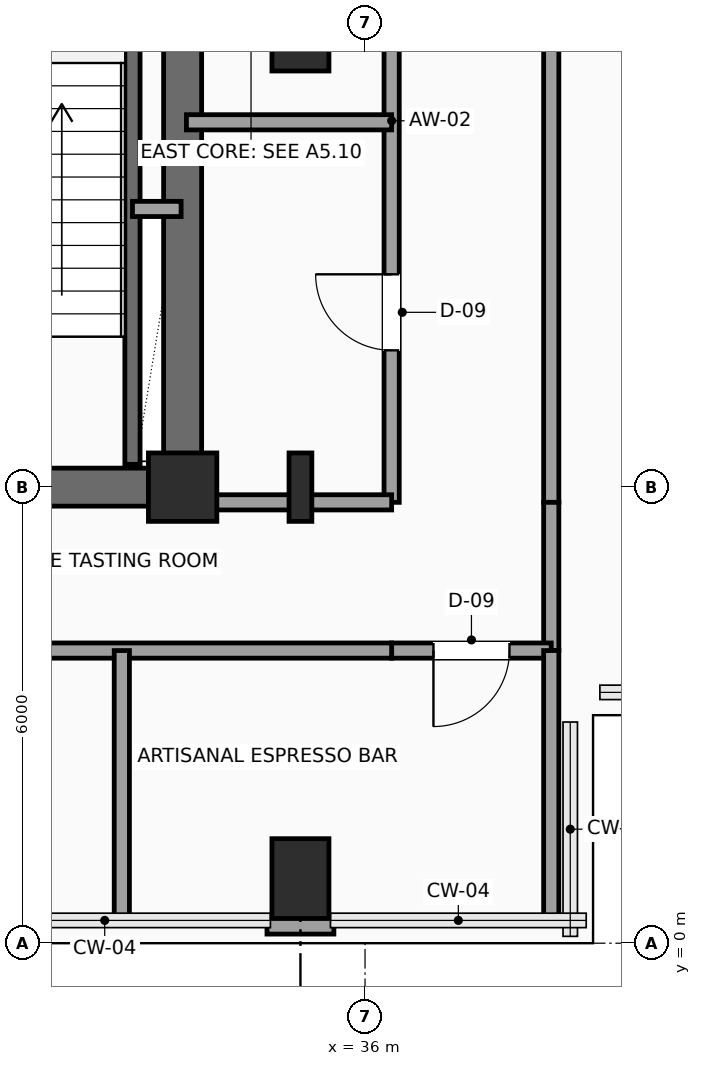
"""IFC4 building model, lengths in metres.
Left out: names, types, materials, properties, quantities, classifications, styles, units other than length and angle.
Written with IfcOpenShell. Run it as: python <this file> out.ifc"""

import sys

from ifc_helpers import new_model, si_unit, direction, frame, frame_2d, origin, origin_2d, place, context, subcontext, project, spatial, rectangle, i_section, extrude, element, fill, save


model = new_model("IFC4")
c1 = context("Model", 3, precision=1e-05, world=origin(), true_north=direction((0.0, 1.0)))
c2 = subcontext(c1, "Body", "Model", "MODEL_VIEW")
j1 = project(units=[si_unit("LENGTHUNIT", "METRE"), si_unit("PLANEANGLEUNIT", "RADIAN")], contexts=[c1])
p1 = place(None, origin())
s1 = spatial("IfcSite", under=j1, at=p1, CompositionType="ELEMENT")
p2 = place(p1, origin())
s2 = spatial("IfcBuilding", under=s1, at=p2, CompositionType="ELEMENT")
p3 = place(p2, frame((0.0, 0.0, 176.7)))
s3 = spatial("IfcBuildingStorey", under=s2, at=p3, CompositionType="ELEMENT", Elevation=176.7)
p4 = place(p3, frame((33.6, 6.0, 0.0), z_axis=(0.0, 0.0, 1.0), x_axis=(1.0, 0.0, 0.0)))
e1 = element("IfcColumn", 1, at=p4, inside=s3, PredefinedType="COLUMN", context=c2, shape_type="SweptSolid", body=[
    extrude(rectangle(XDim=0.9, YDim=0.9, at=origin_2d()), origin(), (0.0, 0.0, 1.0), 3.75),
])
p5 = place(p3, frame((35.15, 0.85, 0.0), z_axis=(0.0, 0.0, 1.0), x_axis=(1.0, 0.0, 0.0)))
e2 = element("IfcColumn", 2, at=p5, inside=s3, PredefinedType="COLUMN", context=c2, shape_type="SweptSolid", body=[
    extrude(rectangle(XDim=0.75, YDim=1.05, at=origin_2d()), origin(), (0.0, 0.0, 1.0), 3.75),
])
p6 = place(p3, frame((35.15, 6.0, 0.0), z_axis=(0.0, 0.0, 1.0), x_axis=(1.0, 0.0, 0.0)))
e3 = element("IfcColumn", 3, at=p6, inside=s3, PredefinedType="COLUMN", context=c2, shape_type="SweptSolid", body=[
    extrude(i_section(OverallWidth=0.3, OverallDepth=0.9, WebThickness=0.019, FlangeThickness=0.035, FilletRadius=0.03, at=origin_2d()), origin(), (0.0, 0.0, 1.0), 3.75),
])
p7 = place(p3, frame((35.15, 12.0, 0.0), z_axis=(0.0, 0.0, 1.0), x_axis=(1.0, 0.0, 0.0)))
e4 = element("IfcColumn", 4, at=p7, inside=s3, PredefinedType="COLUMN", context=c2, shape_type="SweptSolid", body=[
    extrude(rectangle(XDim=0.75, YDim=1.05, at=origin_2d()), origin(), (0.0, 0.0, 1.0), 3.75),
])
p8 = place(p3, frame((35.59, 0.24, 0.0), z_axis=(0.0, 0.0, 1.0), x_axis=(-1.0, 0.0, 0.0)))
e5 = element("IfcWall", 5, at=p8, inside=s3, PredefinedType="SOLIDWALL", context=c2, shape_type="SweptSolid", body=[
    extrude(rectangle(XDim=0.88, YDim=0.24, at=frame_2d((0.44, 0.0))), origin(), (0.0, 0.0, 1.0), 3.54),
])
p9 = place(p3, frame((24.0, 6.0, 0.0), z_axis=(0.0, 0.0, 1.0), x_axis=(1.0, 0.0, 0.0)))
e6 = element("IfcWall", 6, at=p9, inside=s3, PredefinedType="SHEAR", context=c2, shape_type="SweptSolid", body=[
    extrude(rectangle(XDim=9.6, YDim=0.5, at=frame_2d((4.8, 0.0))), origin(), (0.0, 0.0, 1.0), 3.54),
])
p10 = place(p3, frame((33.6, 6.0, 0.0), z_axis=(0.0, 0.0, 1.0), x_axis=(0.0, 1.0, 0.0)))
e7 = element("IfcWall", 7, at=p10, inside=s3, PredefinedType="SHEAR", context=c2, shape_type="SweptSolid", body=[
    extrude(rectangle(XDim=12.0, YDim=0.5, at=frame_2d((6.0, 0.0))), origin(), (0.0, 0.0, 1.0), 3.54),
])
p11 = place(p10, frame((10.15, 0.0, 0.0)))
e8 = element("IfcOpeningElement", 8, at=p11, cuts=e7, PredefinedType="OPENING", context=c2, shape_type="SweptSolid", body=[
    extrude(rectangle(XDim=0.9, YDim=2.15, at=frame_2d((0.45, 1.075))), frame((0.0, 0.26, 0.0), z_axis=(0.0, -1.0, 0.0), x_axis=(1.0, 0.0, 0.0)), (0.0, 0.0, 1.0), 0.52),
])
p12 = place(p3, frame((32.94, 6.3, 0.0), z_axis=(0.0, 0.0, 1.0), x_axis=(0.0, 1.0, 0.0)))
e9 = element("IfcWall", 9, at=p12, inside=s3, PredefinedType="SHEAR", context=c2, shape_type="SweptSolid", body=[
    extrude(rectangle(XDim=8.88, YDim=0.2, at=frame_2d((4.44, 0.0))), origin(), (0.0, 0.0, 1.0), 3.54),
])
p13 = place(p3, frame((32.94, 9.66, 0.0), z_axis=(0.0, 0.0, 1.0), x_axis=(1.0, 0.0, 0.0)))
e10 = element("IfcWall", 10, at=p13, inside=s3, PredefinedType="SOLIDWALL", context=c2, shape_type="SweptSolid", body=[
    extrude(rectangle(XDim=0.64, YDim=0.2, at=frame_2d((0.32, 0.0))), origin(), (0.0, 0.0, 1.0), 3.54),
])
p14 = place(p3, frame((36.35, 5.8, 0.0), z_axis=(0.0, 0.0, 1.0), x_axis=(0.0, 1.0, 0.0)))
e11 = element("IfcWall", 11, at=p14, inside=s3, PredefinedType="PARTITIONING", context=c2, shape_type="SweptSolid", body=[
    extrude(rectangle(XDim=10.08, YDim=0.2, at=frame_2d((5.04, 0.0))), origin(), (0.0, 0.0, 1.0), 3.54),
])
p15 = place(p14, frame((2.0, 0.0, 0.0)))
e12 = element("IfcOpeningElement", 12, at=p15, cuts=e11, PredefinedType="OPENING", context=c2, shape_type="SweptSolid", body=[
    extrude(rectangle(XDim=1.0, YDim=2.2, at=frame_2d((0.5, 1.1))), frame((0.0, 0.11, 0.0), z_axis=(0.0, -1.0, 0.0), x_axis=(1.0, 0.0, 0.0)), (0.0, 0.0, 1.0), 0.22),
])
p16 = place(p14, frame((7.04, 0.0, 0.0)))
e13 = element("IfcOpeningElement", 13, at=p16, cuts=e11, PredefinedType="OPENING", context=c2, shape_type="SweptSolid", body=[
    extrude(rectangle(XDim=1.0, YDim=2.2, at=frame_2d((0.5, 1.1))), frame((0.0, 0.11, 0.0), z_axis=(0.0, -1.0, 0.0), x_axis=(1.0, 0.0, 0.0)), (0.0, 0.0, 1.0), 0.22),
])
p17 = place(p3, frame((38.45, 14.2, 0.0), z_axis=(0.0, 0.0, 1.0), x_axis=(0.0, -1.0, 0.0)))
e14 = element("IfcWall", 14, at=p17, inside=s3, PredefinedType="PARTITIONING", context=c2, shape_type="SweptSolid", body=[
    extrude(rectangle(XDim=8.4, YDim=0.2, at=frame_2d((4.2, 0.0))), origin(), (0.0, 0.0, 1.0), 3.54),
])
p18 = place(p3, frame((38.45, 5.8, 0.0), z_axis=(0.0, 0.0, 1.0), x_axis=(0.0, -1.0, 0.0)))
e15 = element("IfcWall", 15, at=p18, inside=s3, PredefinedType="PARTITIONING", context=c2, shape_type="SweptSolid", body=[
    extrude(rectangle(XDim=1.95, YDim=0.2, at=frame_2d((0.975, 0.0))), origin(), (0.0, 0.0, 1.0), 3.54),
])
p19 = place(p3, frame((38.45, 3.85, 0.0), z_axis=(0.0, 0.0, 1.0), x_axis=(-1.0, 0.0, 0.0)))
e16 = element("IfcWall", 16, at=p19, inside=s3, PredefinedType="PARTITIONING", context=c2, shape_type="SweptSolid", body=[
    extrude(rectangle(XDim=2.1, YDim=0.2, at=frame_2d((1.05, 0.0))), origin(), (0.0, 0.0, 1.0), 3.54),
])
p20 = place(p19, frame((0.55, 0.0, 0.0)))
e17 = element("IfcOpeningElement", 17, at=p20, cuts=e16, PredefinedType="OPENING", context=c2, shape_type="SweptSolid", body=[
    extrude(rectangle(XDim=1.0, YDim=2.2, at=frame_2d((0.5, 1.1))), frame((0.0, 0.11, 0.0), z_axis=(0.0, -1.0, 0.0), x_axis=(1.0, 0.0, 0.0)), (0.0, 0.0, 1.0), 0.22),
])
p21 = place(p3, frame((36.35, 3.85, 0.0), z_axis=(0.0, 0.0, 1.0), x_axis=(-1.0, 0.0, 0.0)))
e18 = element("IfcWall", 18, at=p21, inside=s3, PredefinedType="PARTITIONING", context=c2, shape_type="SweptSolid", body=[
    extrude(rectangle(XDim=12.4, YDim=0.2, at=frame_2d((6.2, 0.0))), origin(), (0.0, 0.0, 1.0), 3.54),
])
p22 = place(p21, frame((10.325, 0.0, 0.0)))
e19 = element("IfcOpeningElement", 19, at=p22, cuts=e18, PredefinedType="OPENING", context=c2, shape_type="SweptSolid", body=[
    extrude(rectangle(XDim=1.0, YDim=2.2, at=frame_2d((0.5, 1.1))), frame((0.0, 0.11, 0.0), z_axis=(0.0, -1.0, 0.0), x_axis=(1.0, 0.0, 0.0)), (0.0, 0.0, 1.0), 0.22),
])
p23 = place(p21, frame((5.9, 0.0, 0.0)))
e20 = element("IfcOpeningElement", 20, at=p23, cuts=e18, PredefinedType="OPENING", context=c2, shape_type="SweptSolid", body=[
    extrude(rectangle(XDim=1.0, YDim=2.2, at=frame_2d((0.5, 1.1))), frame((0.0, 0.11, 0.0), z_axis=(0.0, -1.0, 0.0), x_axis=(1.0, 0.0, 0.0)), (0.0, 0.0, 1.0), 0.22),
])
for number, where, z_axis, x_axis in (
    (21, (32.8, 0.3, 0.0), (0.0, 0.0, 1.0), (0.0, 1.0, 0.0)),
    (22, (38.45, 0.3, 0.0), (0.0, 0.0, 1.0), (0.0, 1.0, 0.0)),
):
    element("IfcWall", number, at=place(p3, frame(where, z_axis=z_axis, x_axis=x_axis)), inside=s3, PredefinedType="PARTITIONING", context=c2, shape_type="SweptSolid", body=[
        extrude(rectangle(XDim=3.55, YDim=0.2, at=frame_2d((1.775, 0.0))), origin(), (0.0, 0.0, 1.0), 3.54),
    ])
p24 = place(p3, frame((33.65, 5.8, 0.0), z_axis=(0.0, 0.0, 1.0), x_axis=(1.0, 0.0, 0.0)))
e23 = element("IfcWall", 23, at=p24, inside=s3, PredefinedType="PARTITIONING", context=c2, shape_type="SweptSolid", body=[
    extrude(rectangle(XDim=2.7, YDim=0.2, at=frame_2d((1.35, 0.0))), origin(), (0.0, 0.0, 1.0), 3.132),
])
p25 = place(p3, frame((33.65, 10.8, 0.0), z_axis=(0.0, 0.0, 1.0), x_axis=(1.0, 0.0, 0.0)))
e24 = element("IfcWall", 24, at=p25, inside=s3, PredefinedType="PARTITIONING", context=c2, shape_type="SweptSolid", body=[
    extrude(rectangle(XDim=2.7, YDim=0.2, at=frame_2d((1.35, 0.0))), origin(), (0.0, 0.0, 1.0), 3.54),
])
p26 = place(p15, origin())
e25 = element("IfcDoor", 25, at=p26, inside=s3, OperationType="SINGLE_SWING_RIGHT", PredefinedType="DOOR", context=c2, shape_type="SweptSolid", body=[
    extrude(rectangle(XDim=1.0, YDim=2.2, at=frame_2d((0.5, 1.1))), frame((0.0, 0.025, 0.0), z_axis=(0.0, -1.0, 0.0), x_axis=(1.0, 0.0, 0.0)), (0.0, 0.0, 1.0), 0.05),
])
fill(e12, e25)
p27 = place(p20, origin())
e26 = element("IfcDoor", 26, at=p27, inside=s3, OperationType="SINGLE_SWING_RIGHT", PredefinedType="DOOR", context=c2, shape_type="SweptSolid", body=[
    extrude(rectangle(XDim=1.0, YDim=2.2, at=frame_2d((0.5, 1.1))), frame((0.0, 0.025, 0.0), z_axis=(0.0, -1.0, 0.0), x_axis=(1.0, 0.0, 0.0)), (0.0, 0.0, 1.0), 0.05),
])
fill(e17, e26)
save(model, sys.argv[1])
